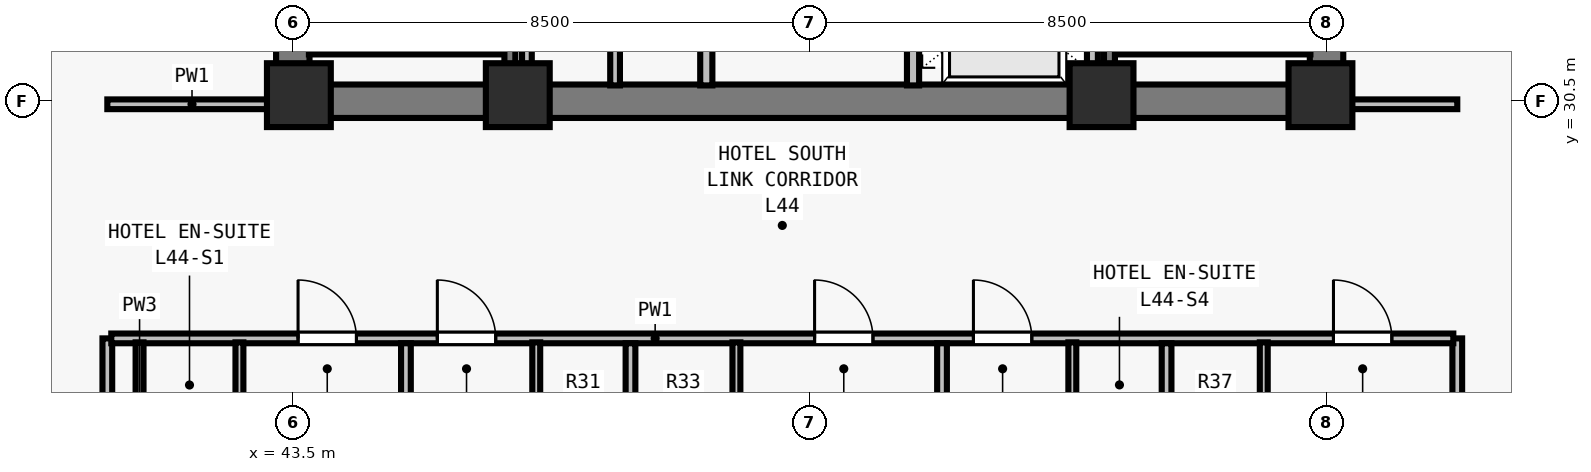
"""IFC4 building model, lengths in metres.
Left out: names, types, materials, properties, quantities, classifications, styles, units other than length and angle.
Written with IfcOpenShell. Run it as: python <this file> out.ifc"""

import sys

from ifc_helpers import new_model, si_unit, direction, frame, frame_2d, origin, origin_2d, place, context, subcontext, project, spatial, rectangle, extrude, element, fill, save


model = new_model("IFC4")
c1 = context("Model", 3, precision=1e-05, world=origin(), true_north=direction((0.0, 1.0)))
c2 = subcontext(c1, "Body", "Model", "MODEL_VIEW")
j1 = project(units=[si_unit("LENGTHUNIT", "METRE"), si_unit("PLANEANGLEUNIT", "RADIAN")], contexts=[c1])
p1 = place(None, origin())
s1 = spatial("IfcSite", under=j1, at=p1, CompositionType="ELEMENT")
p2 = place(p1, origin())
s2 = spatial("IfcBuilding", under=s1, at=p2, CompositionType="ELEMENT")
p3 = place(p2, frame((0.0, 0.0, 162.0)))
s3 = spatial("IfcBuildingStorey", under=s2, at=p3, CompositionType="ELEMENT", Elevation=162.0)
for number, where, z_axis, x_axis in (
    (1, (43.6, 30.6, 0.0), (0.0, 0.0, 1.0), (1.0, 0.0, 0.0)),
    (2, (47.2, 30.6, 0.0), (0.0, 0.0, 1.0), (1.0, 0.0, 0.0)),
    (3, (56.8, 30.6, 0.0), (0.0, 0.0, 1.0), (1.0, 0.0, 0.0)),
    (4, (60.4, 30.6, 0.0), (0.0, 0.0, 1.0), (1.0, 0.0, 0.0)),
):
    element("IfcColumn", number, at=place(p3, frame(where, z_axis=z_axis, x_axis=x_axis)), inside=s3, PredefinedType="COLUMN", context=c2, shape_type="SweptSolid", body=[
        extrude(rectangle(XDim=1.05, YDim=1.05, at=origin_2d()), origin(), (0.0, 0.0, 1.0), 3.5),
    ])
p4 = place(p3, frame((43.225, 30.5, 0.0), z_axis=(0.0, 0.0, 1.0), x_axis=(1.0, 0.0, 0.0)))
e5 = element("IfcWall", 5, at=p4, inside=s3, PredefinedType="SHEAR", context=c2, shape_type="SweptSolid", body=[
    extrude(rectangle(XDim=17.55, YDim=0.55, at=frame_2d((8.775, 0.0))), origin(), (0.0, 0.0, 1.0), 3.28),
])
for number, where, z_axis, x_axis in (
    (6, (43.5, 30.765, 0.0), (0.0, 0.0, 1.0), (0.0, 1.0, 0.0)),
    (7, (60.5, 30.765, 0.0), (0.0, 0.0, 1.0), (0.0, 1.0, 0.0)),
):
    element("IfcWall", number, at=place(p3, frame(where, z_axis=z_axis, x_axis=x_axis)), inside=s3, PredefinedType="SHEAR", context=c2, shape_type="SweptSolid", body=[
        extrude(rectangle(XDim=7.985, YDim=0.55, at=frame_2d((3.993, 0.0))), origin(), (0.0, 0.0, 1.0), 3.28),
    ])
p5 = place(p3, frame((50.3, 30.76, 0.0), z_axis=(0.0, 0.0, 1.0), x_axis=(0.0, 1.0, 0.0)))
e8 = element("IfcWall", 8, at=p5, inside=s3, PredefinedType="SOLIDWALL", context=c2, shape_type="SweptSolid", body=[
    extrude(rectangle(XDim=7.855, YDim=0.2, at=frame_2d((3.927, 0.0))), origin(), (0.0, 0.0, 1.0), 3.28),
])
p6 = place(p5, frame((2.09, 0.0, 0.0)))
e9 = element("IfcOpeningElement", 9, at=p6, cuts=e8, PredefinedType="OPENING", context=c2, shape_type="SweptSolid", body=[
    extrude(rectangle(XDim=0.95, YDim=2.12, at=frame_2d((0.475, 1.06))), frame((0.0, 0.11, 0.0), z_axis=(0.0, -1.0, 0.0), x_axis=(1.0, 0.0, 0.0)), (0.0, 0.0, 1.0), 0.22),
])
p7 = place(p3, frame((53.7, 30.76, 0.0), z_axis=(0.0, 0.0, 1.0), x_axis=(0.0, 1.0, 0.0)))
e10 = element("IfcWall", 10, at=p7, inside=s3, PredefinedType="SOLIDWALL", context=c2, shape_type="SweptSolid", body=[
    extrude(rectangle(XDim=7.855, YDim=0.2, at=frame_2d((3.927, 0.0))), origin(), (0.0, 0.0, 1.0), 3.28),
])
p8 = place(p7, frame((0.79, 0.0, 0.0)))
e11 = element("IfcOpeningElement", 11, at=p8, cuts=e10, PredefinedType="OPENING", context=c2, shape_type="SweptSolid", body=[
    extrude(rectangle(XDim=1.1, YDim=2.2, at=frame_2d((0.55, 1.1))), frame((0.0, 0.11, 0.0), z_axis=(0.0, -1.0, 0.0), x_axis=(1.0, 0.0, 0.0)), (0.0, 0.0, 1.0), 0.22),
])
p9 = place(p7, frame((3.49, 0.0, 0.0)))
e12 = element("IfcOpeningElement", 12, at=p9, cuts=e10, PredefinedType="OPENING", context=c2, shape_type="SweptSolid", body=[
    extrude(rectangle(XDim=1.1, YDim=2.2, at=frame_2d((0.55, 1.1))), frame((0.0, 0.11, 0.0), z_axis=(0.0, -1.0, 0.0), x_axis=(1.0, 0.0, 0.0)), (0.0, 0.0, 1.0), 0.22),
])
p10 = place(p7, frame((6.19, 0.0, 0.0)))
e13 = element("IfcOpeningElement", 13, at=p10, cuts=e10, PredefinedType="OPENING", context=c2, shape_type="SweptSolid", body=[
    extrude(rectangle(XDim=1.1, YDim=2.2, at=frame_2d((0.55, 1.1))), frame((0.0, 0.11, 0.0), z_axis=(0.0, -1.0, 0.0), x_axis=(1.0, 0.0, 0.0)), (0.0, 0.0, 1.0), 0.22),
])
p11 = place(p3, frame((47.35, 30.76, 0.0), z_axis=(0.0, 0.0, 1.0), x_axis=(0.0, 1.0, 0.0)))
e14 = element("IfcWall", 14, at=p11, inside=s3, PredefinedType="PARTITIONING", context=c2, shape_type="SweptSolid", body=[
    extrude(rectangle(XDim=7.855, YDim=0.16, at=frame_2d((3.927, 0.0))), origin(), (0.0, 0.0, 1.0), 3.28),
])
p12 = place(p3, frame((48.8, 30.76, 0.0), z_axis=(0.0, 0.0, 1.0), x_axis=(0.0, 1.0, 0.0)))
e15 = element("IfcWall", 15, at=p12, inside=s3, PredefinedType="PARTITIONING", context=c2, shape_type="SweptSolid", body=[
    extrude(rectangle(XDim=7.855, YDim=0.16, at=frame_2d((3.927, 0.0))), origin(), (0.0, 0.0, 1.0), 3.28),
])
p13 = place(p12, frame((3.49, 0.0, 0.0)))
e16 = element("IfcOpeningElement", 16, at=p13, cuts=e15, PredefinedType="OPENING", context=c2, shape_type="SweptSolid", body=[
    extrude(rectangle(XDim=0.85, YDim=2.12, at=frame_2d((0.425, 1.06))), frame((0.0, 0.09, 0.0), z_axis=(0.0, -1.0, 0.0), x_axis=(1.0, 0.0, 0.0)), (0.0, 0.0, 1.0), 0.18),
])
p14 = place(p3, frame((56.65, 30.76, 0.0), z_axis=(0.0, 0.0, 1.0), x_axis=(0.0, 1.0, 0.0)))
e17 = element("IfcWall", 17, at=p14, inside=s3, PredefinedType="SOLIDWALL", context=c2, shape_type="SweptSolid", body=[
    extrude(rectangle(XDim=7.855, YDim=0.18, at=frame_2d((3.927, 0.0))), origin(), (0.0, 0.0, 1.0), 3.28),
])
p15 = place(p3, frame((40.45, 15.325, 0.0), z_axis=(0.0, 0.0, 1.0), x_axis=(0.0, 1.0, 0.0)))
e18 = element("IfcWall", 18, at=p15, inside=s3, PredefinedType="PARTITIONING", context=c2, shape_type="SweptSolid", body=[
    extrude(rectangle(XDim=11.275, YDim=0.16, at=frame_2d((5.638, 0.0))), origin(), (0.0, 0.0, 1.0), 2.555),
])
p16 = place(p3, frame((40.45, 30.45, 0.0), z_axis=(0.0, 0.0, 1.0), x_axis=(1.0, 0.0, 0.0)))
e19 = element("IfcWall", 19, at=p16, inside=s3, PredefinedType="PARTITIONING", context=c2, shape_type="SweptSolid", body=[
    extrude(rectangle(XDim=2.785, YDim=0.16, at=frame_2d((1.393, 0.0))), origin(), (0.0, 0.0, 1.0), 3.28),
])
p17 = place(p3, frame((62.65, 15.27, 0.0), z_axis=(0.0, 0.0, 1.0), x_axis=(0.0, 1.0, 0.0)))
e20 = element("IfcWall", 20, at=p17, inside=s3, PredefinedType="PARTITIONING", context=c2, shape_type="SweptSolid", body=[
    extrude(rectangle(XDim=11.33, YDim=0.16, at=frame_2d((5.665, 0.0))), origin(), (0.0, 0.0, 1.0), 3.28),
])
p18 = place(p3, frame((60.765, 30.45, 0.0), z_axis=(0.0, 0.0, 1.0), x_axis=(1.0, 0.0, 0.0)))
e21 = element("IfcWall", 21, at=p18, inside=s3, PredefinedType="PARTITIONING", context=c2, shape_type="SweptSolid", body=[
    extrude(rectangle(XDim=1.885, YDim=0.16, at=frame_2d((0.942, 0.0))), origin(), (0.0, 0.0, 1.0), 3.28),
])
p19 = place(p3, frame((40.515, 26.6, 0.0), z_axis=(0.0, 0.0, 1.0), x_axis=(1.0, 0.0, 0.0)))
e22 = element("IfcWall", 22, at=p19, inside=s3, PredefinedType="PARTITIONING", context=c2, shape_type="SweptSolid", body=[
    extrude(rectangle(XDim=22.07, YDim=0.16, at=frame_2d((11.035, 0.0))), origin(), (0.0, 0.0, 1.0), 3.28),
])
p20 = place(p19, frame((3.072, 0.0, 0.0)))
e23 = element("IfcOpeningElement", 23, at=p20, cuts=e22, PredefinedType="OPENING", context=c2, shape_type="SweptSolid", body=[
    extrude(rectangle(XDim=0.96, YDim=2.15, at=frame_2d((0.48, 1.075))), frame((0.0, 0.09, 0.0), z_axis=(0.0, -1.0, 0.0), x_axis=(1.0, 0.0, 0.0)), (0.0, 0.0, 1.0), 0.18),
])
p21 = place(p19, frame((5.362, 0.0, 0.0)))
e24 = element("IfcOpeningElement", 24, at=p21, cuts=e22, PredefinedType="OPENING", context=c2, shape_type="SweptSolid", body=[
    extrude(rectangle(XDim=0.96, YDim=2.15, at=frame_2d((0.48, 1.075))), frame((0.0, 0.09, 0.0), z_axis=(0.0, -1.0, 0.0), x_axis=(1.0, 0.0, 0.0)), (0.0, 0.0, 1.0), 0.18),
])
p22 = place(p19, frame((11.566, 0.0, 0.0)))
e25 = element("IfcOpeningElement", 25, at=p22, cuts=e22, PredefinedType="OPENING", context=c2, shape_type="SweptSolid", body=[
    extrude(rectangle(XDim=0.96, YDim=2.15, at=frame_2d((0.48, 1.075))), frame((0.0, 0.09, 0.0), z_axis=(0.0, -1.0, 0.0), x_axis=(1.0, 0.0, 0.0)), (0.0, 0.0, 1.0), 0.18),
])
p23 = place(p19, frame((14.178, 0.0, 0.0)))
e26 = element("IfcOpeningElement", 26, at=p23, cuts=e22, PredefinedType="OPENING", context=c2, shape_type="SweptSolid", body=[
    extrude(rectangle(XDim=0.96, YDim=2.15, at=frame_2d((0.48, 1.075))), frame((0.0, 0.09, 0.0), z_axis=(0.0, -1.0, 0.0), x_axis=(1.0, 0.0, 0.0)), (0.0, 0.0, 1.0), 0.18),
])
p24 = place(p19, frame((20.099, 0.0, 0.0)))
e27 = element("IfcOpeningElement", 27, at=p24, cuts=e22, PredefinedType="OPENING", context=c2, shape_type="SweptSolid", body=[
    extrude(rectangle(XDim=0.96, YDim=2.15, at=frame_2d((0.48, 1.075))), frame((0.0, 0.09, 0.0), z_axis=(0.0, -1.0, 0.0), x_axis=(1.0, 0.0, 0.0)), (0.0, 0.0, 1.0), 0.18),
])
for number, where, z_axis, x_axis in (
    (28, (40.98, 24.22, 0.0), (0.0, 0.0, 1.0), (0.0, 1.0, 0.0)),
    (29, (42.622, 24.22, 0.0), (0.0, 0.0, 1.0), (0.0, 1.0, 0.0)),
):
    element("IfcWall", number, at=place(p3, frame(where, z_axis=z_axis, x_axis=x_axis)), inside=s3, PredefinedType="PLUMBINGWALL", context=c2, shape_type="SweptSolid", body=[
        extrude(rectangle(XDim=2.315, YDim=0.13, at=frame_2d((1.157, 0.0))), origin(), (0.0, 0.0, 1.0), 3.28),
    ])
p25 = place(p3, frame((45.361, 15.325, 0.0), z_axis=(0.0, 0.0, 1.0), x_axis=(0.0, 1.0, 0.0)))
e30 = element("IfcWall", 30, at=p25, inside=s3, PredefinedType="PARTITIONING", context=c2, shape_type="SweptSolid", body=[
    extrude(rectangle(XDim=11.195, YDim=0.16, at=frame_2d((5.598, 0.0))), origin(), (0.0, 0.0, 1.0), 3.28),
])
p26 = place(p3, frame((47.503, 24.22, 0.0), z_axis=(0.0, 0.0, 1.0), x_axis=(0.0, 1.0, 0.0)))
e31 = element("IfcWall", 31, at=p26, inside=s3, PredefinedType="PLUMBINGWALL", context=c2, shape_type="SweptSolid", body=[
    extrude(rectangle(XDim=2.315, YDim=0.13, at=frame_2d((1.157, 0.0))), origin(), (0.0, 0.0, 1.0), 3.28),
])
p27 = place(p3, frame((49.053, 15.325, 0.0), z_axis=(0.0, 0.0, 1.0), x_axis=(0.0, 1.0, 0.0)))
e32 = element("IfcWall", 32, at=p27, inside=s3, PredefinedType="PARTITIONING", context=c2, shape_type="SweptSolid", body=[
    extrude(rectangle(XDim=11.195, YDim=0.16, at=frame_2d((5.598, 0.0))), origin(), (0.0, 0.0, 1.0), 2.896),
])
p28 = place(p3, frame((50.795, 24.22, 0.0), z_axis=(0.0, 0.0, 1.0), x_axis=(0.0, 1.0, 0.0)))
e33 = element("IfcWall", 33, at=p28, inside=s3, PredefinedType="PLUMBINGWALL", context=c2, shape_type="SweptSolid", body=[
    extrude(rectangle(XDim=2.315, YDim=0.13, at=frame_2d((1.157, 0.0))), origin(), (0.0, 0.0, 1.0), 3.28),
])
p29 = place(p3, frame((54.177, 15.325, 0.0), z_axis=(0.0, 0.0, 1.0), x_axis=(0.0, 1.0, 0.0)))
e34 = element("IfcWall", 34, at=p29, inside=s3, PredefinedType="PARTITIONING", context=c2, shape_type="SweptSolid", body=[
    extrude(rectangle(XDim=11.195, YDim=0.16, at=frame_2d((5.598, 0.0))), origin(), (0.0, 0.0, 1.0), 2.896),
])
p30 = place(p3, frame((56.32, 24.22, 0.0), z_axis=(0.0, 0.0, 1.0), x_axis=(0.0, 1.0, 0.0)))
e35 = element("IfcWall", 35, at=p30, inside=s3, PredefinedType="PLUMBINGWALL", context=c2, shape_type="SweptSolid", body=[
    extrude(rectangle(XDim=2.315, YDim=0.13, at=frame_2d((1.157, 0.0))), origin(), (0.0, 0.0, 1.0), 3.28),
])
p31 = place(p3, frame((57.869, 15.415, 0.0), z_axis=(0.0, 0.0, 1.0), x_axis=(0.0, 1.0, 0.0)))
e36 = element("IfcWall", 36, at=p31, inside=s3, PredefinedType="PARTITIONING", context=c2, shape_type="SweptSolid", body=[
    extrude(rectangle(XDim=11.105, YDim=0.16, at=frame_2d((5.552, 0.0))), origin(), (0.0, 0.0, 1.0), 3.28),
])
p32 = place(p3, frame((59.468, 24.22, 0.0), z_axis=(0.0, 0.0, 1.0), x_axis=(0.0, 1.0, 0.0)))
e37 = element("IfcWall", 37, at=p32, inside=s3, PredefinedType="PLUMBINGWALL", context=c2, shape_type="SweptSolid", body=[
    extrude(rectangle(XDim=2.315, YDim=0.13, at=frame_2d((1.157, 0.0))), origin(), (0.0, 0.0, 1.0), 3.28),
])
p33 = place(p3, frame((43.765, 31.36, 0.0), z_axis=(0.0, 0.0, 1.0), x_axis=(1.0, 0.0, 0.0)))
e38 = element("IfcWall", 38, at=p33, inside=s3, PredefinedType="SOLIDWALL", context=c2, shape_type="SweptSolid", body=[
    extrude(rectangle(XDim=3.23, YDim=0.18, at=frame_2d((1.615, 0.0))), origin(), (0.0, 0.0, 1.0), 3.28),
])
p34 = place(p3, frame((47.07, 38.78, 0.0), z_axis=(0.0, 0.0, 1.0), x_axis=(0.0, -1.0, 0.0)))
e39 = element("IfcWall", 39, at=p34, inside=s3, PredefinedType="SOLIDWALL", context=c2, shape_type="SweptSolid", body=[
    extrude(rectangle(XDim=8.017, YDim=0.18, at=frame_2d((4.009, 0.0))), origin(), (0.0, 0.0, 1.0), 3.28),
])
p35 = place(p3, frame((57.005, 31.36, 0.0), z_axis=(0.0, 0.0, 1.0), x_axis=(1.0, 0.0, 0.0)))
e40 = element("IfcWall", 40, at=p35, inside=s3, PredefinedType="SOLIDWALL", context=c2, shape_type="SweptSolid", body=[
    extrude(rectangle(XDim=3.23, YDim=0.18, at=frame_2d((1.615, 0.0))), origin(), (0.0, 0.0, 1.0), 3.28),
])
p36 = place(p3, frame((56.93, 38.78, 0.0), z_axis=(0.0, 0.0, 1.0), x_axis=(0.0, -1.0, 0.0)))
e41 = element("IfcWall", 41, at=p36, inside=s3, PredefinedType="SOLIDWALL", context=c2, shape_type="SweptSolid", body=[
    extrude(rectangle(XDim=8.017, YDim=0.18, at=frame_2d((4.009, 0.0))), origin(), (0.0, 0.0, 1.0), 3.28),
])
p37 = place(p20, origin())
e42 = element("IfcDoor", 42, at=p37, inside=s3, OperationType="SINGLE_SWING_LEFT", PredefinedType="DOOR", context=c2, shape_type="SweptSolid", body=[
    extrude(rectangle(XDim=0.96, YDim=2.15, at=frame_2d((0.48, 1.075))), frame((0.0, 0.025, 0.0), z_axis=(0.0, -1.0, 0.0), x_axis=(1.0, 0.0, 0.0)), (0.0, 0.0, 1.0), 0.05),
])
fill(e23, e42)
p38 = place(p21, origin())
e43 = element("IfcDoor", 43, at=p38, inside=s3, OperationType="SINGLE_SWING_LEFT", PredefinedType="DOOR", context=c2, shape_type="SweptSolid", body=[
    extrude(rectangle(XDim=0.96, YDim=2.15, at=frame_2d((0.48, 1.075))), frame((0.0, 0.025, 0.0), z_axis=(0.0, -1.0, 0.0), x_axis=(1.0, 0.0, 0.0)), (0.0, 0.0, 1.0), 0.05),
])
fill(e24, e43)
p39 = place(p22, origin())
e44 = element("IfcDoor", 44, at=p39, inside=s3, OperationType="SINGLE_SWING_LEFT", PredefinedType="DOOR", context=c2, shape_type="SweptSolid", body=[
    extrude(rectangle(XDim=0.96, YDim=2.15, at=frame_2d((0.48, 1.075))), frame((0.0, 0.025, 0.0), z_axis=(0.0, -1.0, 0.0), x_axis=(1.0, 0.0, 0.0)), (0.0, 0.0, 1.0), 0.05),
])
fill(e25, e44)
p40 = place(p23, origin())
e45 = element("IfcDoor", 45, at=p40, inside=s3, OperationType="SINGLE_SWING_LEFT", PredefinedType="DOOR", context=c2, shape_type="SweptSolid", body=[
    extrude(rectangle(XDim=0.96, YDim=2.15, at=frame_2d((0.48, 1.075))), frame((0.0, 0.025, 0.0), z_axis=(0.0, -1.0, 0.0), x_axis=(1.0, 0.0, 0.0)), (0.0, 0.0, 1.0), 0.05),
])
fill(e26, e45)
p41 = place(p24, origin())
e46 = element("IfcDoor", 46, at=p41, inside=s3, OperationType="SINGLE_SWING_LEFT", PredefinedType="DOOR", context=c2, shape_type="SweptSolid", body=[
    extrude(rectangle(XDim=0.96, YDim=2.15, at=frame_2d((0.48, 1.075))), frame((0.0, 0.025, 0.0), z_axis=(0.0, -1.0, 0.0), x_axis=(1.0, 0.0, 0.0)), (0.0, 0.0, 1.0), 0.05),
])
fill(e27, e46)
save(model, sys.argv[1])
